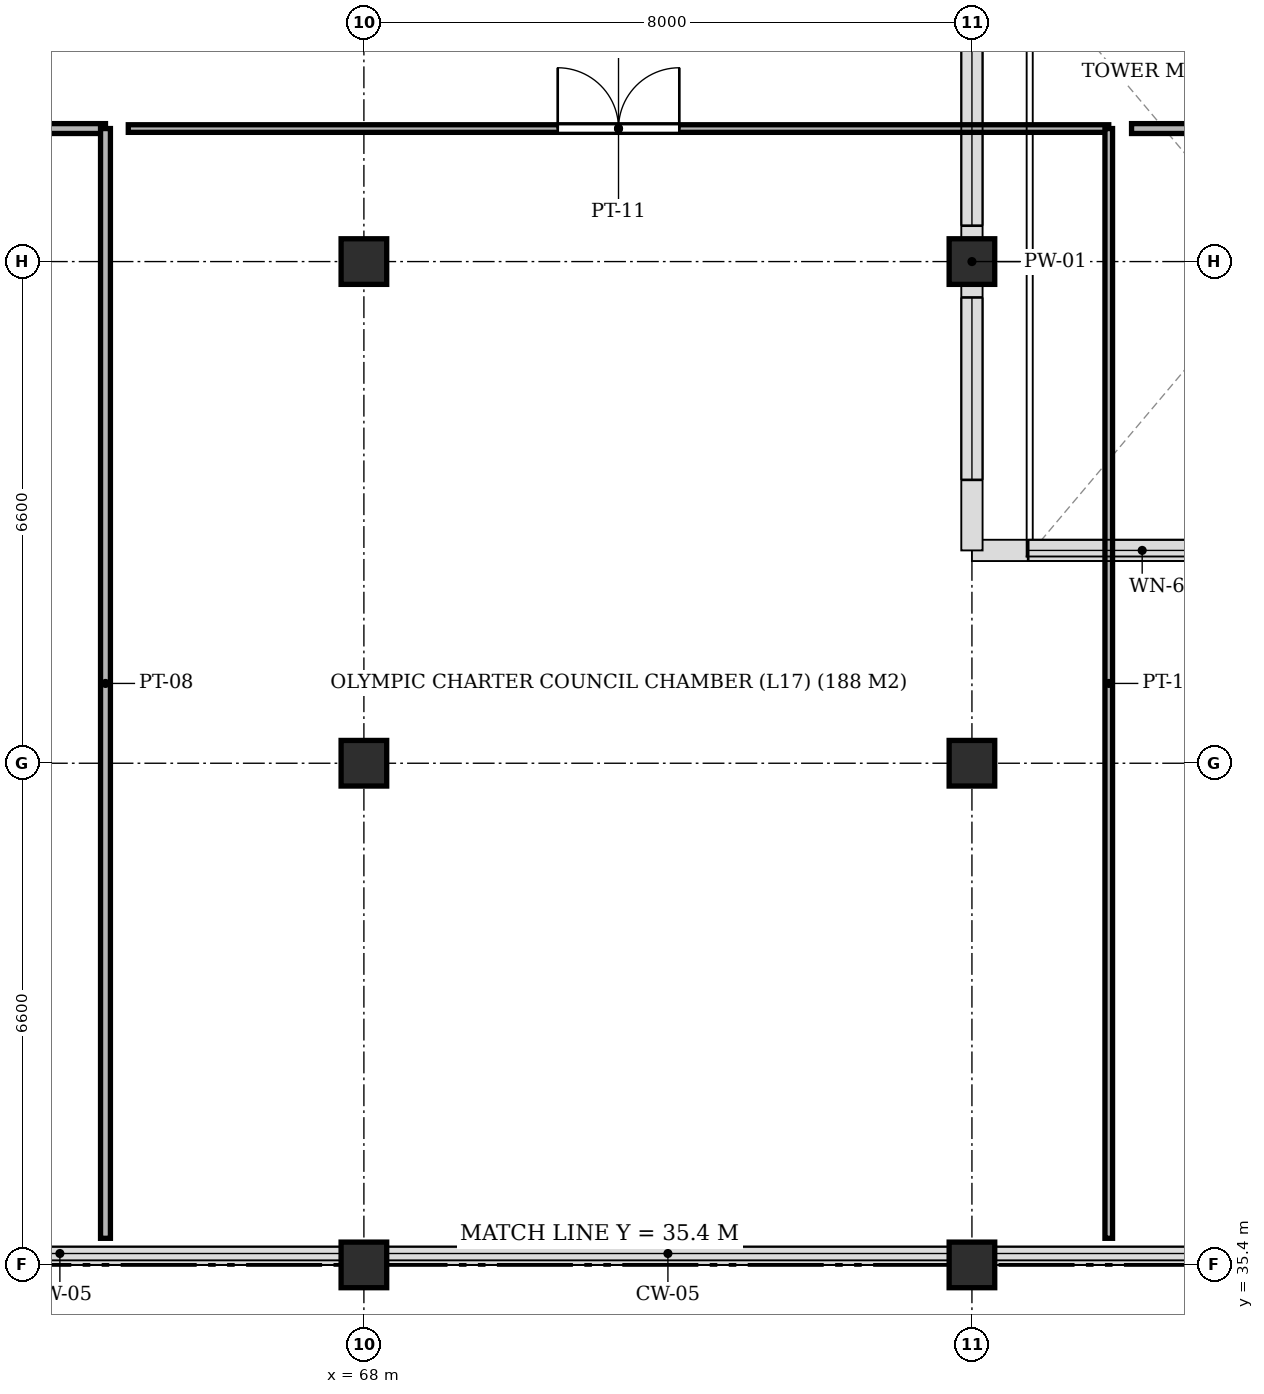
"""IFC4 building model, lengths in metres.
Left out: names, types, materials, properties, quantities, classifications, styles, units other than length and angle.
Written with IfcOpenShell. Run it as: python <this file> out.ifc"""

import sys

from ifc_helpers import new_model, si_unit, direction, frame, frame_2d, origin, origin_2d, place, context, subcontext, project, spatial, rectangle, extrude, element, fill, save


model = new_model("IFC4")
c1 = context("Model", 3, precision=1e-05, world=origin(), true_north=direction((0.0, 1.0)))
c2 = subcontext(c1, "Body", "Model", "MODEL_VIEW")
j1 = project(units=[si_unit("LENGTHUNIT", "METRE"), si_unit("PLANEANGLEUNIT", "RADIAN")], contexts=[c1])
p1 = place(None, origin())
s1 = spatial("IfcSite", under=j1, at=p1, CompositionType="ELEMENT")
p2 = place(p1, origin())
s2 = spatial("IfcBuilding", under=s1, at=p2, CompositionType="ELEMENT")
p3 = place(p2, frame((0.0, 0.0, 66.55)))
s3 = spatial("IfcBuildingStorey", under=s2, at=p3, CompositionType="ELEMENT", Elevation=66.55)
for number, where, z_axis, x_axis in (
    (1, (68.0, 35.4, -0.24), (0.0, 0.0, 1.0), (1.0, 0.0, 0.0)),
    (2, (68.0, 42.0, -0.24), (0.0, 0.0, 1.0), (1.0, 0.0, 0.0)),
    (3, (68.0, 48.6, -0.24), (0.0, 0.0, 1.0), (1.0, 0.0, 0.0)),
    (4, (76.0, 35.4, -0.24), (0.0, 0.0, 1.0), (1.0, 0.0, 0.0)),
    (5, (76.0, 42.0, -0.24), (0.0, 0.0, 1.0), (1.0, 0.0, 0.0)),
    (6, (76.0, 48.6, -0.24), (0.0, 0.0, 1.0), (1.0, 0.0, 0.0)),
):
    element("IfcColumn", number, at=place(p3, frame(where, z_axis=z_axis, x_axis=x_axis)), inside=s3, PredefinedType="COLUMN", context=c2, shape_type="SweptSolid", body=[
        extrude(rectangle(XDim=0.6, YDim=0.6, at=origin_2d()), origin(), (0.0, 0.0, 1.0), 3.19),
    ])
p4 = place(p3, frame((76.0, 44.8, 3.25), z_axis=(0.0, 0.0, 1.0), x_axis=(1.0, 0.0, 0.0)))
e7 = element("IfcWall", 7, at=p4, inside=s3, PredefinedType="PARAPET", context=c2, shape_type="SweptSolid", body=[
    extrude(rectangle(XDim=8.0, YDim=0.28, at=frame_2d((4.0, 0.0))), origin(), (0.0, 0.0, 1.0), 2.1),
])
p5 = place(p4, frame((0.74, 0.0, 0.2)))
e8 = element("IfcOpeningElement", 8, at=p5, cuts=e7, PredefinedType="OPENING", context=c2, shape_type="SweptSolid", body=[
    extrude(rectangle(XDim=3.0, YDim=1.45, at=frame_2d((1.5, 0.725))), frame((0.0, 0.152, 0.0), z_axis=(0.0, -1.0, 0.0), x_axis=(1.0, 0.0, 0.0)), (0.0, 0.0, 1.0), 0.304),
])
p6 = place(p4, frame((4.26, 0.0, 0.2)))
e9 = element("IfcOpeningElement", 9, at=p6, cuts=e7, PredefinedType="OPENING", context=c2, shape_type="SweptSolid", body=[
    extrude(rectangle(XDim=3.0, YDim=1.45, at=frame_2d((1.5, 0.725))), frame((0.0, 0.152, 0.0), z_axis=(0.0, -1.0, 0.0), x_axis=(1.0, 0.0, 0.0)), (0.0, 0.0, 1.0), 0.304),
])
p7 = place(p3, frame((76.0, 52.4, 3.25), z_axis=(0.0, 0.0, 1.0), x_axis=(0.0, -1.0, 0.0)))
e10 = element("IfcWall", 10, at=p7, inside=s3, PredefinedType="PARAPET", context=c2, shape_type="SweptSolid", body=[
    extrude(rectangle(XDim=7.6, YDim=0.28, at=frame_2d((3.8, 0.0))), origin(), (0.0, 0.0, 1.0), 2.1),
])
p8 = place(p7, frame((0.928, 0.0, 0.2)))
e11 = element("IfcOpeningElement", 11, at=p8, cuts=e10, PredefinedType="OPENING", context=c2, shape_type="SweptSolid", body=[
    extrude(rectangle(XDim=2.4, YDim=1.45, at=frame_2d((1.2, 0.725))), frame((0.0, 0.152, 0.0), z_axis=(0.0, -1.0, 0.0), x_axis=(1.0, 0.0, 0.0)), (0.0, 0.0, 1.0), 0.304),
])
p9 = place(p7, frame((4.272, 0.0, 0.2)))
e12 = element("IfcOpeningElement", 12, at=p9, cuts=e10, PredefinedType="OPENING", context=c2, shape_type="SweptSolid", body=[
    extrude(rectangle(XDim=2.4, YDim=1.45, at=frame_2d((1.2, 0.725))), frame((0.0, 0.152, 0.0), z_axis=(0.0, -1.0, 0.0), x_axis=(1.0, 0.0, 0.0)), (0.0, 0.0, 1.0), 0.304),
])
p10 = place(p3, frame((58.5, 35.52, 3.25), z_axis=(0.0, 0.0, 1.0), x_axis=(1.0, 0.0, 0.0)))
e13 = element("IfcWall", 13, at=p10, inside=s3, PredefinedType="PARAPET", context=c2, shape_type="SweptSolid", body=[
    extrude(rectangle(XDim=43.5, YDim=0.24, at=frame_2d((21.75, 0.0))), origin(), (0.0, 0.0, 1.0), 1.25),
])
p11 = place(p3, frame((59.0, 50.35, 0.0), z_axis=(0.0, 0.0, 1.0), x_axis=(1.0, 0.0, 0.0)))
e14 = element("IfcWall", 14, at=p11, inside=s3, PredefinedType="PARTITIONING", context=c2, shape_type="SweptSolid", body=[
    extrude(rectangle(XDim=5.6, YDim=0.13, at=frame_2d((2.8, 0.0))), origin(), (0.0, 0.0, 1.0), 2.53),
])
p12 = place(p11, frame((2.275, 0.0, 0.0)))
e15 = element("IfcOpeningElement", 15, at=p12, cuts=e14, PredefinedType="OPENING", context=c2, shape_type="SweptSolid", body=[
    extrude(rectangle(XDim=1.05, YDim=2.15, at=frame_2d((0.525, 1.075))), frame((0.0, 0.077, 0.0), z_axis=(0.0, -1.0, 0.0), x_axis=(1.0, 0.0, 0.0)), (0.0, 0.0, 1.0), 0.154),
])
p13 = place(p3, frame((64.6, 35.75, 0.0), z_axis=(0.0, 0.0, 1.0), x_axis=(0.0, 1.0, 0.0)))
e16 = element("IfcWall", 16, at=p13, inside=s3, PredefinedType="PARTITIONING", context=c2, shape_type="SweptSolid", body=[
    extrude(rectangle(XDim=14.6, YDim=0.13, at=frame_2d((7.3, 0.0))), origin(), (0.0, 0.0, 1.0), 2.53),
])
p14 = place(p3, frame((64.9, 50.35, 0.0), z_axis=(0.0, 0.0, 1.0), x_axis=(1.0, 0.0, 0.0)))
e17 = element("IfcWall", 17, at=p14, inside=s3, PredefinedType="PARTITIONING", context=c2, shape_type="SweptSolid", body=[
    extrude(rectangle(XDim=12.9, YDim=0.1, at=frame_2d((6.45, 0.0))), origin(), (0.0, 0.0, 1.0), 2.53),
])
p15 = place(p14, frame((5.65, 0.0, 0.0)))
e18 = element("IfcOpeningElement", 18, at=p15, cuts=e17, PredefinedType="OPENING", context=c2, shape_type="SweptSolid", body=[
    extrude(rectangle(XDim=1.6, YDim=2.2, at=frame_2d((0.8, 1.1))), frame((0.0, 0.062, 0.0), z_axis=(0.0, -1.0, 0.0), x_axis=(1.0, 0.0, 0.0)), (0.0, 0.0, 1.0), 0.124),
])
p16 = place(p3, frame((77.8, 35.75, 0.0), z_axis=(0.0, 0.0, 1.0), x_axis=(0.0, 1.0, 0.0)))
e19 = element("IfcWall", 19, at=p16, inside=s3, PredefinedType="PARTITIONING", context=c2, shape_type="SweptSolid", body=[
    extrude(rectangle(XDim=14.6, YDim=0.1, at=frame_2d((7.3, 0.0))), origin(), (0.0, 0.0, 1.0), 2.53),
])
p17 = place(p3, frame((78.1, 50.35, 0.0), z_axis=(0.0, 0.0, 1.0), x_axis=(1.0, 0.0, 0.0)))
e20 = element("IfcWall", 20, at=p17, inside=s3, PredefinedType="PARTITIONING", context=c2, shape_type="SweptSolid", body=[
    extrude(rectangle(XDim=15.3, YDim=0.13, at=frame_2d((7.65, 0.0))), origin(), (0.0, 0.0, 1.0), 2.53),
])
p18 = place(p17, frame((6.75, 0.0, 0.0)))
e21 = element("IfcOpeningElement", 21, at=p18, cuts=e20, PredefinedType="OPENING", context=c2, shape_type="SweptSolid", body=[
    extrude(rectangle(XDim=1.8, YDim=2.25, at=frame_2d((0.9, 1.125))), frame((0.0, 0.077, 0.0), z_axis=(0.0, -1.0, 0.0), x_axis=(1.0, 0.0, 0.0)), (0.0, 0.0, 1.0), 0.154),
])
p19 = place(p5, origin())
e22 = element("IfcWindow", 22, at=p19, inside=s3, PartitioningType="SINGLE_PANEL", PredefinedType="SKYLIGHT", context=c2, shape_type="SweptSolid", body=[
    extrude(rectangle(XDim=3.0, YDim=1.45, at=frame_2d((1.5, 0.725))), frame((0.0, 0.03, 0.0), z_axis=(0.0, -1.0, 0.0), x_axis=(1.0, 0.0, 0.0)), (0.0, 0.0, 1.0), 0.06),
])
fill(e8, e22)
p20 = place(p8, origin())
e23 = element("IfcWindow", 23, at=p20, inside=s3, PartitioningType="SINGLE_PANEL", PredefinedType="SKYLIGHT", context=c2, shape_type="SweptSolid", body=[
    extrude(rectangle(XDim=2.4, YDim=1.45, at=frame_2d((1.2, 0.725))), frame((0.0, 0.03, 0.0), z_axis=(0.0, -1.0, 0.0), x_axis=(1.0, 0.0, 0.0)), (0.0, 0.0, 1.0), 0.06),
])
fill(e11, e23)
p21 = place(p9, origin())
e24 = element("IfcWindow", 24, at=p21, inside=s3, PartitioningType="SINGLE_PANEL", PredefinedType="SKYLIGHT", context=c2, shape_type="SweptSolid", body=[
    extrude(rectangle(XDim=2.4, YDim=1.45, at=frame_2d((1.2, 0.725))), frame((0.0, 0.03, 0.0), z_axis=(0.0, -1.0, 0.0), x_axis=(1.0, 0.0, 0.0)), (0.0, 0.0, 1.0), 0.06),
])
fill(e12, e24)
p22 = place(p15, origin())
e25 = element("IfcDoor", 25, at=p22, inside=s3, OperationType="DOUBLE_DOOR_SINGLE_SWING", PredefinedType="DOOR", context=c2, shape_type="SweptSolid", body=[
    extrude(rectangle(XDim=1.6, YDim=2.2, at=frame_2d((0.8, 1.1))), frame((0.0, 0.025, 0.0), z_axis=(0.0, -1.0, 0.0), x_axis=(1.0, 0.0, 0.0)), (0.0, 0.0, 1.0), 0.05),
])
fill(e18, e25)
save(model, sys.argv[1])
